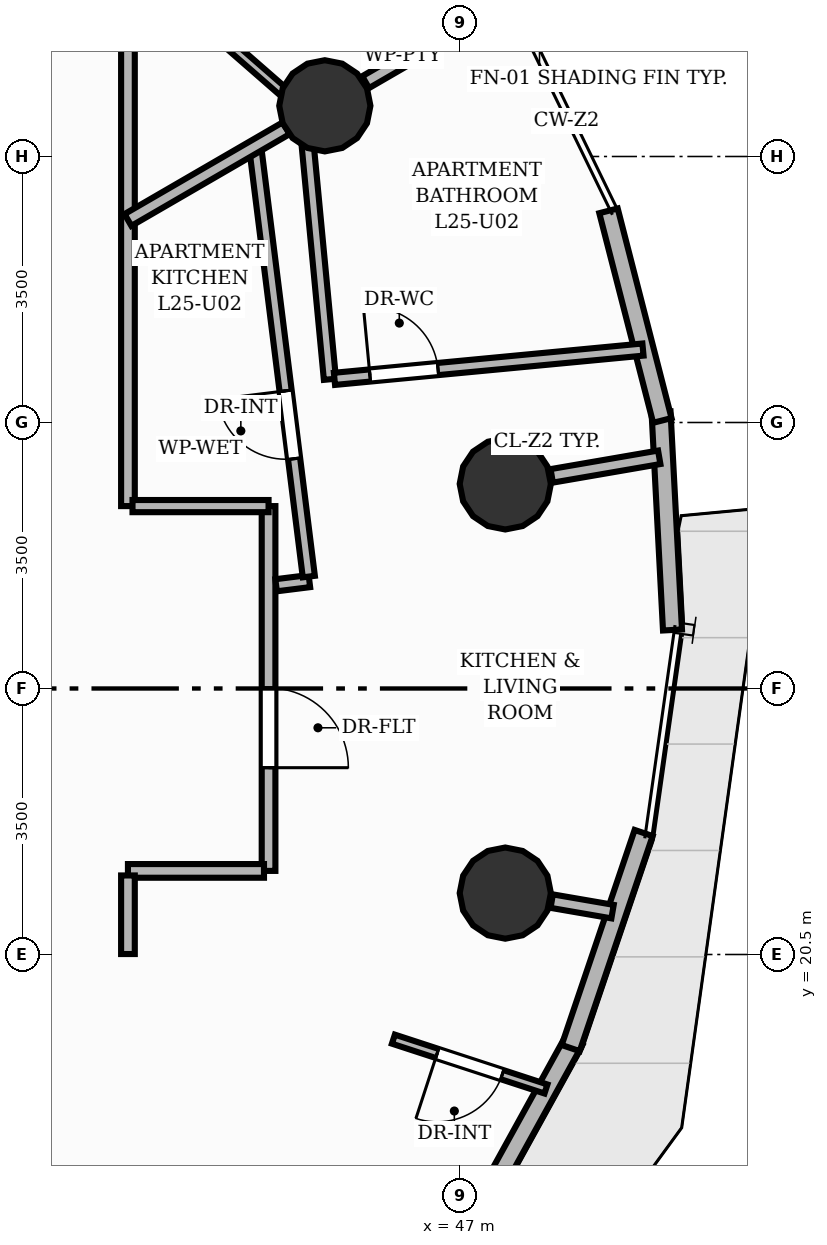
"""IFC4 building model, lengths in metres.
Left out: names, types, materials, properties, quantities, classifications, styles, units other than length and angle.
Written with IfcOpenShell. Run it as: python <this file> out.ifc"""

import sys

from ifc_helpers import new_model, si_unit, direction, frame, frame_2d, origin, origin_2d, place, context, subcontext, project, spatial, rectangle, circle, extrude, element, fill, save


model = new_model("IFC4")
c1 = context("Model", 3, precision=1e-05, world=origin(), true_north=direction((0.0, 1.0)))
c2 = subcontext(c1, "Body", "Model", "MODEL_VIEW")
j1 = project(units=[si_unit("LENGTHUNIT", "METRE"), si_unit("PLANEANGLEUNIT", "RADIAN")], contexts=[c1])
p1 = place(None, origin())
s1 = spatial("IfcSite", under=j1, at=p1, CompositionType="ELEMENT")
p2 = place(p1, origin())
s2 = spatial("IfcBuilding", under=s1, at=p2, CompositionType="ELEMENT")
p3 = place(p2, frame((0.0, 0.0, 86.88)))
s3 = spatial("IfcBuildingStorey", under=s2, at=p3, CompositionType="ELEMENT", Elevation=86.88)
for number, where, z_axis, x_axis in (
    (1, (47.594, 26.692, 0.0), (0.0, 0.0, 1.0), (1.0, 0.0, 0.0)),
    (2, (45.22, 31.667, 0.0), (0.0, 0.0, 1.0), (1.0, 0.0, 0.0)),
    (3, (47.594, 21.308, 0.0), (0.0, 0.0, 1.0), (1.0, 0.0, 0.0)),
):
    element("IfcColumn", number, at=place(p3, frame(where, z_axis=z_axis, x_axis=x_axis)), inside=s3, PredefinedType="COLUMN", context=c2, shape_type="SweptSolid", body=[
        extrude(circle(Radius=0.6, at=origin_2d()), origin(), (0.0, 0.0, 1.0), 3.2),
    ])
p4 = place(p3, frame((48.5, 19.371, 0.0), z_axis=(0.0, 0.0, 1.0), x_axis=(-0.482904421948, -0.875673066426, 0.0)))
e4 = element("IfcWall", 4, at=p4, inside=s3, PredefinedType="SOLIDWALL", context=c2, shape_type="SweptSolid", body=[
    extrude(rectangle(XDim=3.061, YDim=0.25, at=frame_2d((1.53, 0.0))), origin(), (0.0, 0.0, 1.0), 2.96),
])
p5 = place(p3, frame((49.415, 22.099, 0.0), z_axis=(0.0, 0.0, 1.0), x_axis=(-0.321149814784, -0.947028403198, 0.0)))
e5 = element("IfcWall", 5, at=p5, inside=s3, PredefinedType="SOLIDWALL", context=c2, shape_type="SweptSolid", body=[
    extrude(rectangle(XDim=2.988, YDim=0.25, at=frame_2d((1.494, 0.0))), origin(), (0.0, 0.0, 1.0), 2.96),
])
p6 = place(p3, frame((49.644, 27.64, 0.0), z_axis=(0.0, 0.0, 1.0), x_axis=(0.052411702269, -0.998625562193, 0.0)))
e6 = element("IfcWall", 6, at=p6, inside=s3, PredefinedType="SOLIDWALL", context=c2, shape_type="SweptSolid", body=[
    extrude(rectangle(XDim=2.874, YDim=0.25, at=frame_2d((1.437, 0.0))), origin(), (0.0, 0.0, 1.0), 2.96),
])
p7 = place(p3, frame((48.953, 30.285, 0.0), z_axis=(0.0, 0.0, 1.0), x_axis=(0.248825035787, -0.96854845081, 0.0)))
e7 = element("IfcWall", 7, at=p7, inside=s3, PredefinedType="SOLIDWALL", context=c2, shape_type="SweptSolid", body=[
    extrude(rectangle(XDim=2.847, YDim=0.25, at=frame_2d((1.424, 0.0))), origin(), (0.0, 0.0, 1.0), 2.96),
])
p8 = place(p3, frame((48.206, 26.798, 0.0), z_axis=(0.0, 0.0, 1.0), x_axis=(0.985402123708, 0.170242928172, 0.0)))
e8 = element("IfcWall", 8, at=p8, inside=s3, PredefinedType="PARTITIONING", context=c2, shape_type="SweptSolid", body=[
    extrude(rectangle(XDim=1.436, YDim=0.18, at=frame_2d((0.718, 0.0))), origin(), (0.0, 0.0, 1.0), 2.261),
])
p9 = place(p3, frame((45.757, 31.978, 0.0), z_axis=(0.0, 0.0, 1.0), x_axis=(0.865046065875, 0.501692439563, 0.0)))
e9 = element("IfcWall", 9, at=p9, inside=s3, PredefinedType="PARTITIONING", context=c2, shape_type="SweptSolid", body=[
    extrude(rectangle(XDim=1.994, YDim=0.18, at=frame_2d((0.997, 0.0))), origin(), (0.0, 0.0, 1.0), 2.261),
])
p10 = place(p3, frame((48.206, 21.202, 0.0), z_axis=(0.0, 0.0, 1.0), x_axis=(0.985418430365, -0.170148514822, 0.0)))
e10 = element("IfcWall", 10, at=p10, inside=s3, PredefinedType="PARTITIONING", context=c2, shape_type="SweptSolid", body=[
    extrude(rectangle(XDim=0.812, YDim=0.18, at=frame_2d((0.406, 0.0))), origin(), (0.0, 0.0, 1.0), 2.261),
])
p11 = place(p3, frame((44.48, 26.4, 0.0), z_axis=(0.0, 0.0, 1.0), x_axis=(0.0, -1.0, 0.0)))
e11 = element("IfcWall", 11, at=p11, inside=s3, PredefinedType="PARTITIONING", context=c2, shape_type="SweptSolid", body=[
    extrude(rectangle(XDim=4.8, YDim=0.18, at=frame_2d((2.4, 0.0))), origin(), (0.0, 0.0, 1.0), 2.955),
])
p12 = place(p11, frame((2.392, 0.0, 0.0)))
e12 = element("IfcOpeningElement", 12, at=p12, cuts=e11, PredefinedType="OPENING", context=c2, shape_type="SweptSolid", body=[
    extrude(rectangle(XDim=1.05, YDim=2.15, at=frame_2d((0.525, 1.075))), frame((0.0, 0.1, 0.0), z_axis=(0.0, -1.0, 0.0), x_axis=(1.0, 0.0, 0.0)), (0.0, 0.0, 1.0), 0.2),
])
p13 = place(p3, frame((44.42, 21.6, 0.0), z_axis=(0.0, 0.0, 1.0), x_axis=(-1.0, 0.0, 0.0)))
e13 = element("IfcWall", 13, at=p13, inside=s3, PredefinedType="PARTITIONING", context=c2, shape_type="SweptSolid", body=[
    extrude(rectangle(XDim=1.79, YDim=0.18, at=frame_2d((0.895, 0.0))), origin(), (0.0, 0.0, 1.0), 2.261),
])
p14 = place(p3, frame((42.63, 21.54, 0.0), z_axis=(0.0, 0.0, 1.0), x_axis=(0.0, -1.0, 0.0)))
e14 = element("IfcWall", 14, at=p14, inside=s3, PredefinedType="PARTITIONING", context=c2, shape_type="SweptSolid", body=[
    extrude(rectangle(XDim=1.034, YDim=0.18, at=frame_2d((0.517, 0.0))), origin(), (0.0, 0.0, 1.0), 2.955),
])
p15 = place(p3, frame((42.63, 32.63, 0.0), z_axis=(0.0, 0.0, 1.0), x_axis=(0.0, -1.0, 0.0)))
e15 = element("IfcWall", 15, at=p15, inside=s3, PredefinedType="PARTITIONING", context=c2, shape_type="SweptSolid", body=[
    extrude(rectangle(XDim=6.23, YDim=0.18, at=frame_2d((3.115, 0.0))), origin(), (0.0, 0.0, 1.0), 2.955),
])
p16 = place(p3, frame((42.69, 26.4, 0.0), z_axis=(0.0, 0.0, 1.0), x_axis=(1.0, 0.0, 0.0)))
e16 = element("IfcWall", 16, at=p16, inside=s3, PredefinedType="PLUMBINGWALL", context=c2, shape_type="SweptSolid", body=[
    extrude(rectangle(XDim=1.79, YDim=0.16, at=frame_2d((0.895, 0.0))), origin(), (0.0, 0.0, 1.0), 2.261),
])
p17 = place(p3, frame((44.997, 31.13, 0.0), z_axis=(0.0, 0.0, 1.0), x_axis=(0.094558062352, -0.995519348302, 0.0)))
e17 = element("IfcWall", 17, at=p17, inside=s3, PredefinedType="PLUMBINGWALL", context=c2, shape_type="SweptSolid", body=[
    extrude(rectangle(XDim=3.075, YDim=0.16, at=frame_2d((1.538, 0.0))), origin(), (0.0, 0.0, 1.0), 2.955),
])
p18 = place(p3, frame((45.347, 28.074, 0.0), z_axis=(0.0, 0.0, 1.0), x_axis=(0.995525564748, 0.09449259195, 0.0)))
e18 = element("IfcWall", 18, at=p18, inside=s3, PredefinedType="PLUMBINGWALL", context=c2, shape_type="SweptSolid", body=[
    extrude(rectangle(XDim=4.077, YDim=0.16, at=frame_2d((2.039, 0.0))), origin(), (0.0, 0.0, 1.0), 2.642),
])
p19 = place(p18, frame((0.469, 0.0, 0.0)))
e19 = element("IfcOpeningElement", 19, at=p19, cuts=e18, PredefinedType="OPENING", context=c2, shape_type="SweptSolid", body=[
    extrude(rectangle(XDim=0.9, YDim=2.1, at=frame_2d((0.45, 1.05))), frame((0.0, 0.09, 0.0), z_axis=(0.0, -1.0, 0.0), x_axis=(1.0, 0.0, 0.0)), (0.0, 0.0, 1.0), 0.18),
])
p20 = place(p3, frame((48.13, 18.73, 0.0), z_axis=(0.0, 0.0, 1.0), x_axis=(-0.950573429935, 0.310499845896, 0.0)))
e20 = element("IfcWall", 20, at=p20, inside=s3, PredefinedType="PARTITIONING", context=c2, shape_type="SweptSolid", body=[
    extrude(rectangle(XDim=2.112, YDim=0.125, at=frame_2d((1.056, 0.0))), origin(), (0.0, 0.0, 1.0), 2.955),
])
p21 = place(p20, frame((0.606, 0.0, 0.0)))
e21 = element("IfcOpeningElement", 21, at=p21, cuts=e20, PredefinedType="OPENING", context=c2, shape_type="SweptSolid", body=[
    extrude(rectangle(XDim=0.9, YDim=2.1, at=frame_2d((0.45, 1.05))), frame((0.0, 0.073, 0.0), z_axis=(0.0, -1.0, 0.0), x_axis=(1.0, 0.0, 0.0)), (0.0, 0.0, 1.0), 0.145),
])
p22 = place(p3, frame((44.579, 25.358, 0.0), z_axis=(0.0, 0.0, 1.0), x_axis=(0.992294886409, 0.123898581135, 0.0)))
e22 = element("IfcWall", 22, at=p22, inside=s3, PredefinedType="PLUMBINGWALL", context=c2, shape_type="SweptSolid", body=[
    extrude(rectangle(XDim=0.441, YDim=0.16, at=frame_2d((0.221, 0.0))), origin(), (0.0, 0.0, 1.0), 2.955),
])
p23 = place(p3, frame((45.01, 25.473, 0.0), z_axis=(0.0, 0.0, 1.0), x_axis=(-0.123955741663, 0.992287747636, 0.0)))
e23 = element("IfcWall", 23, at=p23, inside=s3, PredefinedType="PLUMBINGWALL", context=c2, shape_type="SweptSolid", body=[
    extrude(rectangle(XDim=5.706, YDim=0.16, at=frame_2d((2.853, 0.0))), origin(), (0.0, 0.0, 1.0), 2.955),
])
p24 = place(p23, frame((1.563, 0.0, 0.0)))
e24 = element("IfcOpeningElement", 24, at=p24, cuts=e23, PredefinedType="OPENING", context=c2, shape_type="SweptSolid", body=[
    extrude(rectangle(XDim=0.9, YDim=2.1, at=frame_2d((0.45, 1.05))), frame((0.0, 0.09, 0.0), z_axis=(0.0, -1.0, 0.0), x_axis=(1.0, 0.0, 0.0)), (0.0, 0.0, 1.0), 0.18),
])
p25 = place(p3, frame((42.63, 30.165, 0.0), z_axis=(0.0, 0.0, 1.0), x_axis=(0.86502326608, 0.501731750182, 0.0)))
e25 = element("IfcWall", 25, at=p25, inside=s3, PredefinedType="PARTITIONING", context=c2, shape_type="SweptSolid", body=[
    extrude(rectangle(XDim=2.407, YDim=0.18, at=frame_2d((1.204, 0.0))), origin(), (0.0, 0.0, 1.0), 2.261),
])
p26 = place(p3, frame((41.112, 34.96, 0.0), z_axis=(0.0, 0.0, 1.0), x_axis=(0.753425123405, -0.657533712765, 0.0)))
e26 = element("IfcWall", 26, at=p26, inside=s3, PredefinedType="PARTITIONING", context=c2, shape_type="SweptSolid", body=[
    extrude(rectangle(XDim=4.72, YDim=0.125, at=frame_2d((2.36, 0.0))), origin(), (0.0, 0.0, 1.0), 2.404),
])
p27 = place(p26, frame((1.49, 0.0, 0.0)))
e27 = element("IfcOpeningElement", 27, at=p27, cuts=e26, PredefinedType="OPENING", context=c2, shape_type="SweptSolid", body=[
    extrude(rectangle(XDim=0.9, YDim=2.1, at=frame_2d((0.45, 1.05))), frame((0.0, 0.073, 0.0), z_axis=(0.0, -1.0, 0.0), x_axis=(1.0, 0.0, 0.0)), (0.0, 0.0, 1.0), 0.145),
])
p28 = place(p12, origin())
e28 = element("IfcDoor", 28, at=p28, inside=s3, OperationType="SINGLE_SWING_RIGHT", PredefinedType="DOOR", context=c2, shape_type="SweptSolid", body=[
    extrude(rectangle(XDim=1.05, YDim=2.15, at=frame_2d((0.525, 1.075))), frame((0.0, 0.025, 0.0), z_axis=(0.0, -1.0, 0.0), x_axis=(1.0, 0.0, 0.0)), (0.0, 0.0, 1.0), 0.05),
])
fill(e12, e28)
p29 = place(p19, origin())
e29 = element("IfcDoor", 29, at=p29, inside=s3, OperationType="SINGLE_SWING_LEFT", PredefinedType="DOOR", context=c2, shape_type="SweptSolid", body=[
    extrude(rectangle(XDim=0.9, YDim=2.1, at=frame_2d((0.45, 1.05))), frame((0.0, 0.025, 0.0), z_axis=(0.0, -1.0, 0.0), x_axis=(1.0, 0.0, 0.0)), (0.0, 0.0, 1.0), 0.05),
])
fill(e19, e29)
p30 = place(p21, origin())
e30 = element("IfcDoor", 30, at=p30, inside=s3, OperationType="SINGLE_SWING_RIGHT", PredefinedType="DOOR", context=c2, shape_type="SweptSolid", body=[
    extrude(rectangle(XDim=0.9, YDim=2.1, at=frame_2d((0.45, 1.05))), frame((0.0, 0.025, 0.0), z_axis=(0.0, -1.0, 0.0), x_axis=(1.0, 0.0, 0.0)), (0.0, 0.0, 1.0), 0.05),
])
fill(e21, e30)
p31 = place(p24, origin())
e31 = element("IfcDoor", 31, at=p31, inside=s3, OperationType="SINGLE_SWING_RIGHT", PredefinedType="DOOR", context=c2, shape_type="SweptSolid", body=[
    extrude(rectangle(XDim=0.9, YDim=2.1, at=frame_2d((0.45, 1.05))), frame((0.0, 0.025, 0.0), z_axis=(0.0, -1.0, 0.0), x_axis=(1.0, 0.0, 0.0)), (0.0, 0.0, 1.0), 0.05),
])
fill(e24, e31)
save(model, sys.argv[1])
